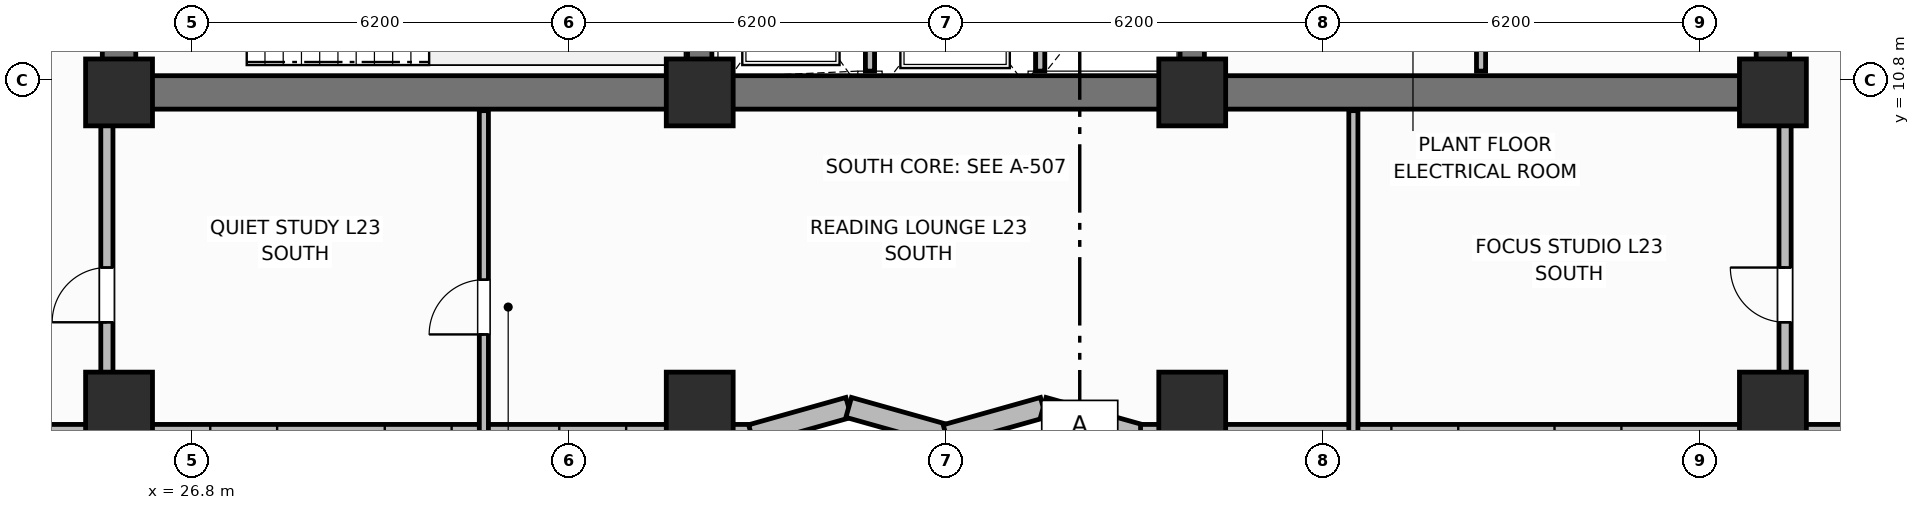
"""IFC4 building model, lengths in metres.
Left out: names, types, materials, properties, quantities, classifications, styles, units other than length and angle.
Written with IfcOpenShell. Run it as: python <this file> out.ifc"""

import sys

from ifc_helpers import new_model, si_unit, direction, frame, frame_2d, origin, origin_2d, place, context, subcontext, project, spatial, rectangle, extrude, element, fill, save


model = new_model("IFC4")
c1 = context("Model", 3, precision=1e-05, world=origin(), true_north=direction((0.0, 1.0)))
c2 = subcontext(c1, "Body", "Model", "MODEL_VIEW")
j1 = project(units=[si_unit("LENGTHUNIT", "METRE"), si_unit("PLANEANGLEUNIT", "RADIAN")], contexts=[c1])
p1 = place(None, origin())
s1 = spatial("IfcSite", under=j1, at=p1, CompositionType="ELEMENT")
p2 = place(p1, origin())
s2 = spatial("IfcBuilding", under=s1, at=p2, CompositionType="ELEMENT")
p3 = place(p2, frame((0.0, 0.0, 95.7)))
s3 = spatial("IfcBuildingStorey", under=s2, at=p3, CompositionType="ELEMENT", Elevation=95.7)
p4 = place(p3, frame((52.8, 10.6, 0.0), z_axis=(0.0, 0.0, 1.0), x_axis=(-1.0, 0.0, 0.0)))
e1 = element("IfcWall", 1, at=p4, inside=s3, PredefinedType="SHEAR", context=c2, shape_type="SweptSolid", body=[
    extrude(rectangle(XDim=27.2, YDim=0.55, at=frame_2d((13.6, 0.0))), origin(), (0.0, 0.0, 1.0), 3.7),
])
for number, where, z_axis, x_axis in (
    (2, (25.6, 10.875, 0.0), (0.0, 0.0, 1.0), (0.0, 1.0, 0.0)),
    (3, (52.8, 10.875, 0.0), (0.0, 0.0, 1.0), (0.0, 1.0, 0.0)),
):
    element("IfcWall", number, at=place(p3, frame(where, z_axis=z_axis, x_axis=x_axis)), inside=s3, PredefinedType="SHEAR", context=c2, shape_type="SweptSolid", body=[
        extrude(rectangle(XDim=5.65, YDim=0.55, at=frame_2d((2.825, 0.0))), origin(), (0.0, 0.0, 1.0), 3.7),
    ])
for number, where, z_axis, x_axis in (
    (4, (35.15, 10.875, 0.0), (0.0, 0.0, 1.0), (0.0, 1.0, 0.0)),
    (5, (43.25, 10.875, 0.0), (0.0, 0.0, 1.0), (0.0, 1.0, 0.0)),
):
    element("IfcWall", number, at=place(p3, frame(where, z_axis=z_axis, x_axis=x_axis)), inside=s3, PredefinedType="SHEAR", context=c2, shape_type="SweptSolid", body=[
        extrude(rectangle(XDim=5.65, YDim=0.4, at=frame_2d((2.825, 0.0))), origin(), (0.0, 0.0, 1.0), 3.7),
    ])
for number, where, z_axis, x_axis in (
    (6, (25.6, 10.6, 0.0), (0.0, 0.0, 1.0), (1.0, 0.0, 0.0)),
    (7, (35.15, 10.6, 0.0), (0.0, 0.0, 1.0), (1.0, 0.0, 0.0)),
    (8, (43.25, 10.6, 0.0), (0.0, 0.0, 1.0), (1.0, 0.0, 0.0)),
    (9, (52.8, 10.6, 0.0), (0.0, 0.0, 1.0), (1.0, 0.0, 0.0)),
    (10, (25.6, 5.45, 0.0), (0.0, 0.0, 1.0), (1.0, 0.0, 0.0)),
    (11, (35.15, 5.45, 0.0), (0.0, 0.0, 1.0), (1.0, 0.0, 0.0)),
    (12, (43.25, 5.45, 0.0), (0.0, 0.0, 1.0), (1.0, 0.0, 0.0)),
    (13, (52.8, 5.45, 0.0), (0.0, 0.0, 1.0), (1.0, 0.0, 0.0)),
):
    element("IfcColumn", number, at=place(p3, frame(where, z_axis=z_axis, x_axis=x_axis)), inside=s3, PredefinedType="COLUMN", context=c2, shape_type="SweptSolid", body=[
        extrude(rectangle(XDim=1.1, YDim=1.1, at=origin_2d()), origin(), (0.0, 0.0, 1.0), 3.7),
    ])
p5 = place(p3, frame((18.6, 4.97, 0.0), z_axis=(0.0, 0.0, 1.0), x_axis=(1.0, 0.0, 0.0)))
e14 = element("IfcWall", 14, at=p5, inside=s3, PredefinedType="SOLIDWALL", context=c2, shape_type="SweptSolid", body=[
    extrude(rectangle(XDim=17.4, YDim=0.34, at=frame_2d((8.7, 0.0))), origin(), (0.0, 0.0, 1.0), 2.7),
])
p6 = place(p5, frame((1.71, 0.0, 0.93)))
e15 = element("IfcOpeningElement", 15, at=p6, cuts=e14, PredefinedType="OPENING", context=c2, shape_type="SweptSolid", body=[
    extrude(rectangle(XDim=1.1, YDim=1.65, at=frame_2d((0.55, 0.825))), frame((0.0, 0.18, 0.0), z_axis=(0.0, -1.0, 0.0), x_axis=(1.0, 0.0, 0.0)), (0.0, 0.0, 1.0), 0.36),
])
p7 = place(p5, frame((4.58, 0.0, 0.93)))
e16 = element("IfcOpeningElement", 16, at=p7, cuts=e14, PredefinedType="OPENING", context=c2, shape_type="SweptSolid", body=[
    extrude(rectangle(XDim=1.1, YDim=1.65, at=frame_2d((0.55, 0.825))), frame((0.0, 0.18, 0.0), z_axis=(0.0, -1.0, 0.0), x_axis=(1.0, 0.0, 0.0)), (0.0, 0.0, 1.0), 0.36),
])
p8 = place(p5, frame((8.5, 0.0, 0.93)))
e17 = element("IfcOpeningElement", 17, at=p8, cuts=e14, PredefinedType="OPENING", context=c2, shape_type="SweptSolid", body=[
    extrude(rectangle(XDim=1.1, YDim=1.65, at=frame_2d((0.55, 0.825))), frame((0.0, 0.18, 0.0), z_axis=(0.0, -1.0, 0.0), x_axis=(1.0, 0.0, 0.0)), (0.0, 0.0, 1.0), 0.36),
])
p9 = place(p5, frame((11.37, 0.0, 0.93)))
e18 = element("IfcOpeningElement", 18, at=p9, cuts=e14, PredefinedType="OPENING", context=c2, shape_type="SweptSolid", body=[
    extrude(rectangle(XDim=1.1, YDim=1.65, at=frame_2d((0.55, 0.825))), frame((0.0, 0.18, 0.0), z_axis=(0.0, -1.0, 0.0), x_axis=(1.0, 0.0, 0.0)), (0.0, 0.0, 1.0), 0.36),
])
p10 = place(p5, frame((14.24, 0.0, 0.93)))
e19 = element("IfcOpeningElement", 19, at=p10, cuts=e14, PredefinedType="OPENING", context=c2, shape_type="SweptSolid", body=[
    extrude(rectangle(XDim=1.1, YDim=1.65, at=frame_2d((0.55, 0.825))), frame((0.0, 0.18, 0.0), z_axis=(0.0, -1.0, 0.0), x_axis=(1.0, 0.0, 0.0)), (0.0, 0.0, 1.0), 0.36),
])
p11 = place(p3, frame((36.0, 4.97, 0.0), z_axis=(0.0, 0.0, 1.0), x_axis=(0.962662902433, 0.270703040766, 0.0)))
e20 = element("IfcWall", 20, at=p11, inside=s3, PredefinedType="SOLIDWALL", context=c2, shape_type="SweptSolid", body=[
    extrude(rectangle(XDim=1.662, YDim=0.34, at=frame_2d((0.831, 0.0))), origin(), (0.0, 0.0, 1.0), 2.7),
])
p12 = place(p3, frame((37.6, 5.42, 0.0), z_axis=(0.0, 0.0, 1.0), x_axis=(0.962652136636, -0.270741322725, 0.0)))
e21 = element("IfcWall", 21, at=p12, inside=s3, PredefinedType="SOLIDWALL", context=c2, shape_type="SweptSolid", body=[
    extrude(rectangle(XDim=1.662, YDim=0.34, at=frame_2d((0.831, 0.0))), origin(), (0.0, 0.0, 1.0), 2.7),
])
p13 = place(p3, frame((39.2, 4.97, 0.0), z_axis=(0.0, 0.0, 1.0), x_axis=(0.962662902433, 0.270703040766, 0.0)))
e22 = element("IfcWall", 22, at=p13, inside=s3, PredefinedType="SOLIDWALL", context=c2, shape_type="SweptSolid", body=[
    extrude(rectangle(XDim=1.662, YDim=0.34, at=frame_2d((0.831, 0.0))), origin(), (0.0, 0.0, 1.0), 2.7),
])
p14 = place(p3, frame((40.8, 5.42, 0.0), z_axis=(0.0, 0.0, 1.0), x_axis=(0.962652136636, -0.270741322725, 0.0)))
e23 = element("IfcWall", 23, at=p14, inside=s3, PredefinedType="SOLIDWALL", context=c2, shape_type="SweptSolid", body=[
    extrude(rectangle(XDim=1.662, YDim=0.34, at=frame_2d((0.831, 0.0))), origin(), (0.0, 0.0, 1.0), 2.7),
])
p15 = place(p3, frame((42.4, 4.97, 0.0), z_axis=(0.0, 0.0, 1.0), x_axis=(1.0, 0.0, 0.0)))
e24 = element("IfcWall", 24, at=p15, inside=s3, PredefinedType="SOLIDWALL", context=c2, shape_type="SweptSolid", body=[
    extrude(rectangle(XDim=17.4, YDim=0.34, at=frame_2d((8.7, 0.0))), origin(), (0.0, 0.0, 1.0), 2.7),
])
p16 = place(p15, frame((4.125, 0.0, 0.93)))
e25 = element("IfcOpeningElement", 25, at=p16, cuts=e24, PredefinedType="OPENING", context=c2, shape_type="SweptSolid", body=[
    extrude(rectangle(XDim=1.1, YDim=1.65, at=frame_2d((0.55, 0.825))), frame((0.0, 0.18, 0.0), z_axis=(0.0, -1.0, 0.0), x_axis=(1.0, 0.0, 0.0)), (0.0, 0.0, 1.0), 0.36),
])
p17 = place(p15, frame((6.808, 0.0, 0.93)))
e26 = element("IfcOpeningElement", 26, at=p17, cuts=e24, PredefinedType="OPENING", context=c2, shape_type="SweptSolid", body=[
    extrude(rectangle(XDim=1.1, YDim=1.65, at=frame_2d((0.55, 0.825))), frame((0.0, 0.18, 0.0), z_axis=(0.0, -1.0, 0.0), x_axis=(1.0, 0.0, 0.0)), (0.0, 0.0, 1.0), 0.36),
])
p18 = place(p15, frame((12.875, 0.0, 0.93)))
e27 = element("IfcOpeningElement", 27, at=p18, cuts=e24, PredefinedType="OPENING", context=c2, shape_type="SweptSolid", body=[
    extrude(rectangle(XDim=1.1, YDim=1.65, at=frame_2d((0.55, 0.825))), frame((0.0, 0.18, 0.0), z_axis=(0.0, -1.0, 0.0), x_axis=(1.0, 0.0, 0.0)), (0.0, 0.0, 1.0), 0.36),
])
p19 = place(p15, frame((14.858, 0.0, 0.93)))
e28 = element("IfcOpeningElement", 28, at=p19, cuts=e24, PredefinedType="OPENING", context=c2, shape_type="SweptSolid", body=[
    extrude(rectangle(XDim=1.1, YDim=1.65, at=frame_2d((0.55, 0.825))), frame((0.0, 0.18, 0.0), z_axis=(0.0, -1.0, 0.0), x_axis=(1.0, 0.0, 0.0)), (0.0, 0.0, 1.0), 0.36),
])
for number, where, z_axis, x_axis in (
    (29, (37.95, 10.95, 0.0), (0.0, 0.0, 1.0), (0.0, 1.0, 0.0)),
    (30, (40.75, 10.95, 0.0), (0.0, 0.0, 1.0), (0.0, 1.0, 0.0)),
):
    element("IfcWall", number, at=place(p3, frame(where, z_axis=z_axis, x_axis=x_axis)), inside=s3, PredefinedType="PARTITIONING", context=c2, shape_type="SweptSolid", body=[
        extrude(rectangle(XDim=2.75, YDim=0.15, at=frame_2d((1.375, 0.0))), origin(), (0.0, 0.0, 1.0), 2.53),
    ])
p20 = place(p3, frame((48.0, 10.95, 0.0), z_axis=(0.0, 0.0, 1.0), x_axis=(0.0, 1.0, 0.0)))
e31 = element("IfcWall", 31, at=p20, inside=s3, PredefinedType="PARTITIONING", context=c2, shape_type="SweptSolid", body=[
    extrude(rectangle(XDim=5.63, YDim=0.15, at=frame_2d((2.815, 0.0))), origin(), (0.0, 0.0, 1.0), 2.53),
])
p21 = place(p3, frame((31.6, 4.97, 0.0), z_axis=(0.0, 0.0, 1.0), x_axis=(0.0, 1.0, 0.0)))
e32 = element("IfcWall", 32, at=p21, inside=s3, PredefinedType="PARTITIONING", context=c2, shape_type="SweptSolid", body=[
    extrude(rectangle(XDim=5.33, YDim=0.15, at=frame_2d((2.665, 0.0))), origin(), (0.0, 0.0, 1.0), 2.53),
])
p22 = place(p21, frame((1.65, 0.0, 0.0)))
e33 = element("IfcOpeningElement", 33, at=p22, cuts=e32, PredefinedType="OPENING", context=c2, shape_type="SweptSolid", body=[
    extrude(rectangle(XDim=0.9, YDim=2.1, at=frame_2d((0.45, 1.05))), frame((0.0, 0.085, 0.0), z_axis=(0.0, -1.0, 0.0), x_axis=(1.0, 0.0, 0.0)), (0.0, 0.0, 1.0), 0.17),
])
p23 = place(p3, frame((45.9, 4.97, 0.0), z_axis=(0.0, 0.0, 1.0), x_axis=(0.0, 1.0, 0.0)))
e34 = element("IfcWall", 34, at=p23, inside=s3, PredefinedType="PARTITIONING", context=c2, shape_type="SweptSolid", body=[
    extrude(rectangle(XDim=5.33, YDim=0.15, at=frame_2d((2.665, 0.0))), origin(), (0.0, 0.0, 1.0), 2.53),
])
p24 = place(p3, frame((25.4, 5.97, 0.0), z_axis=(0.0, 0.0, 1.0), x_axis=(0.0, 1.0, 0.0)))
e35 = element("IfcWall", 35, at=p24, inside=s3, PredefinedType="PARTITIONING", context=c2, shape_type="SweptSolid", body=[
    extrude(rectangle(XDim=4.33, YDim=0.2, at=frame_2d((2.165, 0.0))), origin(), (0.0, 0.0, 1.0), 2.53),
])
p25 = place(p24, frame((0.85, 0.0, 0.0)))
e36 = element("IfcOpeningElement", 36, at=p25, cuts=e35, PredefinedType="OPENING", context=c2, shape_type="SweptSolid", body=[
    extrude(rectangle(XDim=0.9, YDim=2.1, at=frame_2d((0.45, 1.05))), frame((0.0, 0.11, 0.0), z_axis=(0.0, -1.0, 0.0), x_axis=(1.0, 0.0, 0.0)), (0.0, 0.0, 1.0), 0.22),
])
p26 = place(p3, frame((53.0, 5.97, 0.0), z_axis=(0.0, 0.0, 1.0), x_axis=(0.0, 1.0, 0.0)))
e37 = element("IfcWall", 37, at=p26, inside=s3, PredefinedType="PARTITIONING", context=c2, shape_type="SweptSolid", body=[
    extrude(rectangle(XDim=4.33, YDim=0.2, at=frame_2d((2.165, 0.0))), origin(), (0.0, 0.0, 1.0), 2.53),
])
p27 = place(p26, frame((0.85, 0.0, 0.0)))
e38 = element("IfcOpeningElement", 38, at=p27, cuts=e37, PredefinedType="OPENING", context=c2, shape_type="SweptSolid", body=[
    extrude(rectangle(XDim=0.9, YDim=2.1, at=frame_2d((0.45, 1.05))), frame((0.0, 0.11, 0.0), z_axis=(0.0, -1.0, 0.0), x_axis=(1.0, 0.0, 0.0)), (0.0, 0.0, 1.0), 0.22),
])
p28 = place(p22, origin())
e39 = element("IfcDoor", 39, at=p28, inside=s3, OperationType="SINGLE_SWING_LEFT", PredefinedType="DOOR", context=c2, shape_type="SweptSolid", body=[
    extrude(rectangle(XDim=0.9, YDim=2.1, at=frame_2d((0.45, 1.05))), frame((0.0, 0.025, 0.0), z_axis=(0.0, -1.0, 0.0), x_axis=(1.0, 0.0, 0.0)), (0.0, 0.0, 1.0), 0.05),
])
fill(e33, e39)
p29 = place(p25, origin())
e40 = element("IfcDoor", 40, at=p29, inside=s3, OperationType="SINGLE_SWING_LEFT", PredefinedType="DOOR", context=c2, shape_type="SweptSolid", body=[
    extrude(rectangle(XDim=0.9, YDim=2.1, at=frame_2d((0.45, 1.05))), frame((0.0, 0.025, 0.0), z_axis=(0.0, -1.0, 0.0), x_axis=(1.0, 0.0, 0.0)), (0.0, 0.0, 1.0), 0.05),
])
fill(e36, e40)
p30 = place(p27, origin())
e41 = element("IfcDoor", 41, at=p30, inside=s3, OperationType="SINGLE_SWING_RIGHT", PredefinedType="DOOR", context=c2, shape_type="SweptSolid", body=[
    extrude(rectangle(XDim=0.9, YDim=2.1, at=frame_2d((0.45, 1.05))), frame((0.0, 0.025, 0.0), z_axis=(0.0, -1.0, 0.0), x_axis=(1.0, 0.0, 0.0)), (0.0, 0.0, 1.0), 0.05),
])
fill(e38, e41)
save(model, sys.argv[1])
